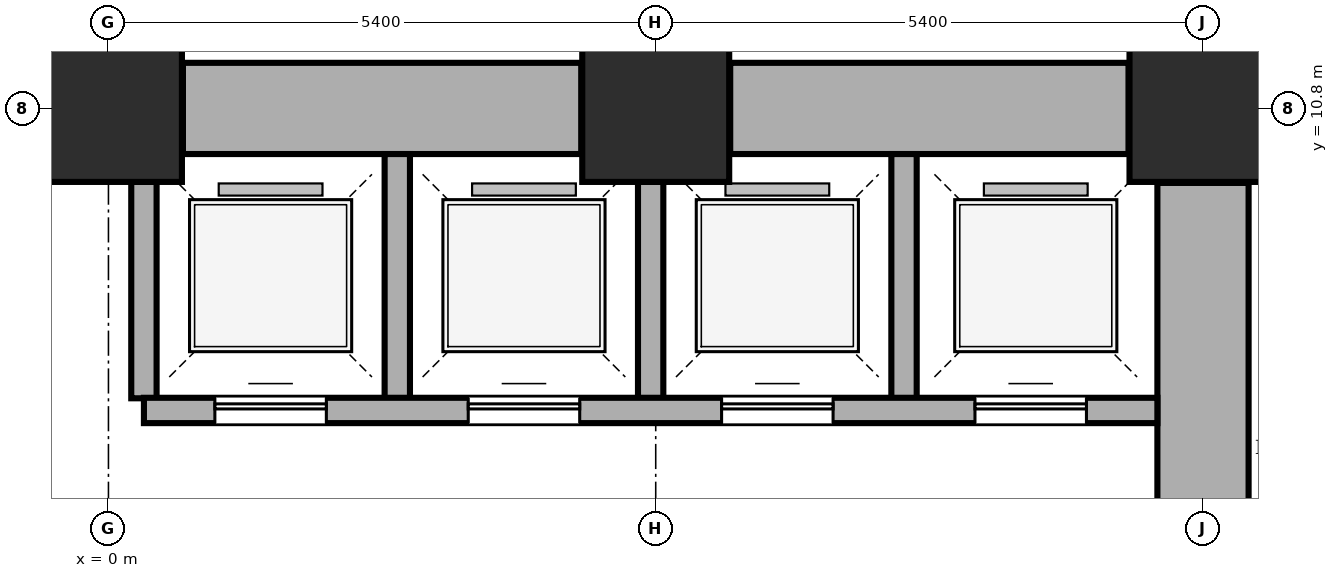
"""IFC4 building model, lengths in metres.
Left out: names, types, materials, properties, quantities, classifications, styles, units other than length and angle.
Written with IfcOpenShell. Run it as: python <this file> out.ifc"""

import sys

from ifc_helpers import new_model, si_unit, direction, frame, frame_2d, origin, origin_2d, place, context, subcontext, project, spatial, rectangle, extrude, element, fill, save


model = new_model("IFC4")
c1 = context("Model", 3, precision=1e-05, world=origin(), true_north=direction((0.0, 1.0)))
c2 = subcontext(c1, "Body", "Model", "MODEL_VIEW")
j1 = project(units=[si_unit("LENGTHUNIT", "METRE"), si_unit("PLANEANGLEUNIT", "RADIAN")], contexts=[c1])
p1 = place(None, origin())
s1 = spatial("IfcSite", under=j1, at=p1, CompositionType="ELEMENT")
p2 = place(p1, origin())
s2 = spatial("IfcBuilding", under=s1, at=p2, CompositionType="ELEMENT")
p3 = place(p2, origin())
s3 = spatial("IfcBuildingStorey", under=s2, at=p3, CompositionType="ELEMENT", Elevation=0.0)
for number, where, z_axis, x_axis in (
    (1, (0.0, 10.8, 0.0), (0.0, 0.0, 1.0), (1.0, 0.0, 0.0)),
    (2, (5.4, 10.8, 0.0), (0.0, 0.0, 1.0), (1.0, 0.0, 0.0)),
    (3, (10.8, 10.8, 0.0), (0.0, 0.0, 1.0), (1.0, 0.0, 0.0)),
):
    element("IfcColumn", number, at=place(p3, frame(where, z_axis=z_axis, x_axis=x_axis)), inside=s3, PredefinedType="COLUMN", context=c2, shape_type="SweptSolid", body=[
        extrude(rectangle(XDim=1.45, YDim=1.45, at=origin_2d()), origin(), (0.0, 0.0, 1.0), 4.5),
    ])
for number, where, z_axis, x_axis in (
    (4, (0.735, 10.8, 0.0), (0.0, 0.0, 1.0), (1.0, 0.0, 0.0)),
    (5, (6.135, 10.8, 0.0), (0.0, 0.0, 1.0), (1.0, 0.0, 0.0)),
    (6, (10.8, 6.135, 0.0), (0.0, 0.0, 1.0), (0.0, 1.0, 0.0)),
):
    element("IfcWall", number, at=place(p3, frame(where, z_axis=z_axis, x_axis=x_axis)), inside=s3, PredefinedType="SHEAR", context=c2, shape_type="SweptSolid", body=[
        extrude(rectangle(XDim=3.93, YDim=0.9, at=frame_2d((1.965, 0.0))), origin(), (0.0, 0.0, 1.0), 4.5),
    ])
p4 = place(p3, frame((2.85, 7.94, 0.0), z_axis=(0.0, 0.0, 1.0), x_axis=(0.0, 1.0, 0.0)))
e7 = element("IfcWall", 7, at=p4, inside=s3, PredefinedType="SHEAR", context=c2, shape_type="SweptSolid", body=[
    extrude(rectangle(XDim=2.41, YDim=0.25, at=frame_2d((1.205, 0.0))), origin(), (0.0, 0.0, 1.0), 4.5),
])
for number, where, z_axis, x_axis in (
    (8, (0.35, 7.94, 0.0), (0.0, 0.0, 1.0), (0.0, 1.0, 0.0)),
    (9, (5.35, 7.94, 0.0), (0.0, 0.0, 1.0), (0.0, 1.0, 0.0)),
):
    element("IfcWall", number, at=place(p3, frame(where, z_axis=z_axis, x_axis=x_axis)), inside=s3, PredefinedType="SHEAR", context=c2, shape_type="SweptSolid", body=[
        extrude(rectangle(XDim=2.135, YDim=0.25, at=frame_2d((1.067, 0.0))), origin(), (0.0, 0.0, 1.0), 4.5),
    ])
p5 = place(p3, frame((7.85, 7.94, 0.0), z_axis=(0.0, 0.0, 1.0), x_axis=(0.0, 1.0, 0.0)))
e10 = element("IfcWall", 10, at=p5, inside=s3, PredefinedType="SHEAR", context=c2, shape_type="SweptSolid", body=[
    extrude(rectangle(XDim=2.41, YDim=0.25, at=frame_2d((1.205, 0.0))), origin(), (0.0, 0.0, 1.0), 4.5),
])
p6 = place(p3, frame((0.35, 7.82, 0.0), z_axis=(0.0, 0.0, 1.0), x_axis=(1.0, 0.0, 0.0)))
e11 = element("IfcWall", 11, at=p6, inside=s3, PredefinedType="SHEAR", context=c2, shape_type="SweptSolid", body=[
    extrude(rectangle(XDim=10.0, YDim=0.25, at=frame_2d((5.0, 0.0))), origin(), (0.0, 0.0, 1.0), 4.5),
])
p7 = place(p6, frame((0.7, 0.0, 0.0)))
e12 = element("IfcOpeningElement", 12, at=p7, cuts=e11, PredefinedType="OPENING", context=c2, shape_type="SweptSolid", body=[
    extrude(rectangle(XDim=1.1, YDim=2.1, at=frame_2d((0.55, 1.05))), frame((0.0, 0.135, 0.0), z_axis=(0.0, -1.0, 0.0), x_axis=(1.0, 0.0, 0.0)), (0.0, 0.0, 1.0), 0.27),
])
p8 = place(p6, frame((3.2, 0.0, 0.0)))
e13 = element("IfcOpeningElement", 13, at=p8, cuts=e11, PredefinedType="OPENING", context=c2, shape_type="SweptSolid", body=[
    extrude(rectangle(XDim=1.1, YDim=2.1, at=frame_2d((0.55, 1.05))), frame((0.0, 0.135, 0.0), z_axis=(0.0, -1.0, 0.0), x_axis=(1.0, 0.0, 0.0)), (0.0, 0.0, 1.0), 0.27),
])
p9 = place(p6, frame((5.7, 0.0, 0.0)))
e14 = element("IfcOpeningElement", 14, at=p9, cuts=e11, PredefinedType="OPENING", context=c2, shape_type="SweptSolid", body=[
    extrude(rectangle(XDim=1.1, YDim=2.1, at=frame_2d((0.55, 1.05))), frame((0.0, 0.135, 0.0), z_axis=(0.0, -1.0, 0.0), x_axis=(1.0, 0.0, 0.0)), (0.0, 0.0, 1.0), 0.27),
])
p10 = place(p6, frame((8.2, 0.0, 0.0)))
e15 = element("IfcOpeningElement", 15, at=p10, cuts=e11, PredefinedType="OPENING", context=c2, shape_type="SweptSolid", body=[
    extrude(rectangle(XDim=1.1, YDim=2.1, at=frame_2d((0.55, 1.05))), frame((0.0, 0.135, 0.0), z_axis=(0.0, -1.0, 0.0), x_axis=(1.0, 0.0, 0.0)), (0.0, 0.0, 1.0), 0.27),
])
p11 = place(p7, origin())
e16 = element("IfcDoor", 16, at=p11, inside=s3, OperationType="SLIDING_TO_LEFT", PredefinedType="DOOR", context=c2, shape_type="SweptSolid", body=[
    extrude(rectangle(XDim=1.1, YDim=2.1, at=frame_2d((0.55, 1.05))), frame((0.0, 0.025, 0.0), z_axis=(0.0, -1.0, 0.0), x_axis=(1.0, 0.0, 0.0)), (0.0, 0.0, 1.0), 0.05),
])
fill(e12, e16)
p12 = place(p8, origin())
e17 = element("IfcDoor", 17, at=p12, inside=s3, OperationType="SLIDING_TO_LEFT", PredefinedType="DOOR", context=c2, shape_type="SweptSolid", body=[
    extrude(rectangle(XDim=1.1, YDim=2.1, at=frame_2d((0.55, 1.05))), frame((0.0, 0.025, 0.0), z_axis=(0.0, -1.0, 0.0), x_axis=(1.0, 0.0, 0.0)), (0.0, 0.0, 1.0), 0.05),
])
fill(e13, e17)
p13 = place(p9, origin())
e18 = element("IfcDoor", 18, at=p13, inside=s3, OperationType="SLIDING_TO_LEFT", PredefinedType="DOOR", context=c2, shape_type="SweptSolid", body=[
    extrude(rectangle(XDim=1.1, YDim=2.1, at=frame_2d((0.55, 1.05))), frame((0.0, 0.025, 0.0), z_axis=(0.0, -1.0, 0.0), x_axis=(1.0, 0.0, 0.0)), (0.0, 0.0, 1.0), 0.05),
])
fill(e14, e18)
p14 = place(p10, origin())
e19 = element("IfcDoor", 19, at=p14, inside=s3, OperationType="SLIDING_TO_LEFT", PredefinedType="DOOR", context=c2, shape_type="SweptSolid", body=[
    extrude(rectangle(XDim=1.1, YDim=2.1, at=frame_2d((0.55, 1.05))), frame((0.0, 0.025, 0.0), z_axis=(0.0, -1.0, 0.0), x_axis=(1.0, 0.0, 0.0)), (0.0, 0.0, 1.0), 0.05),
])
fill(e15, e19)
save(model, sys.argv[1])
